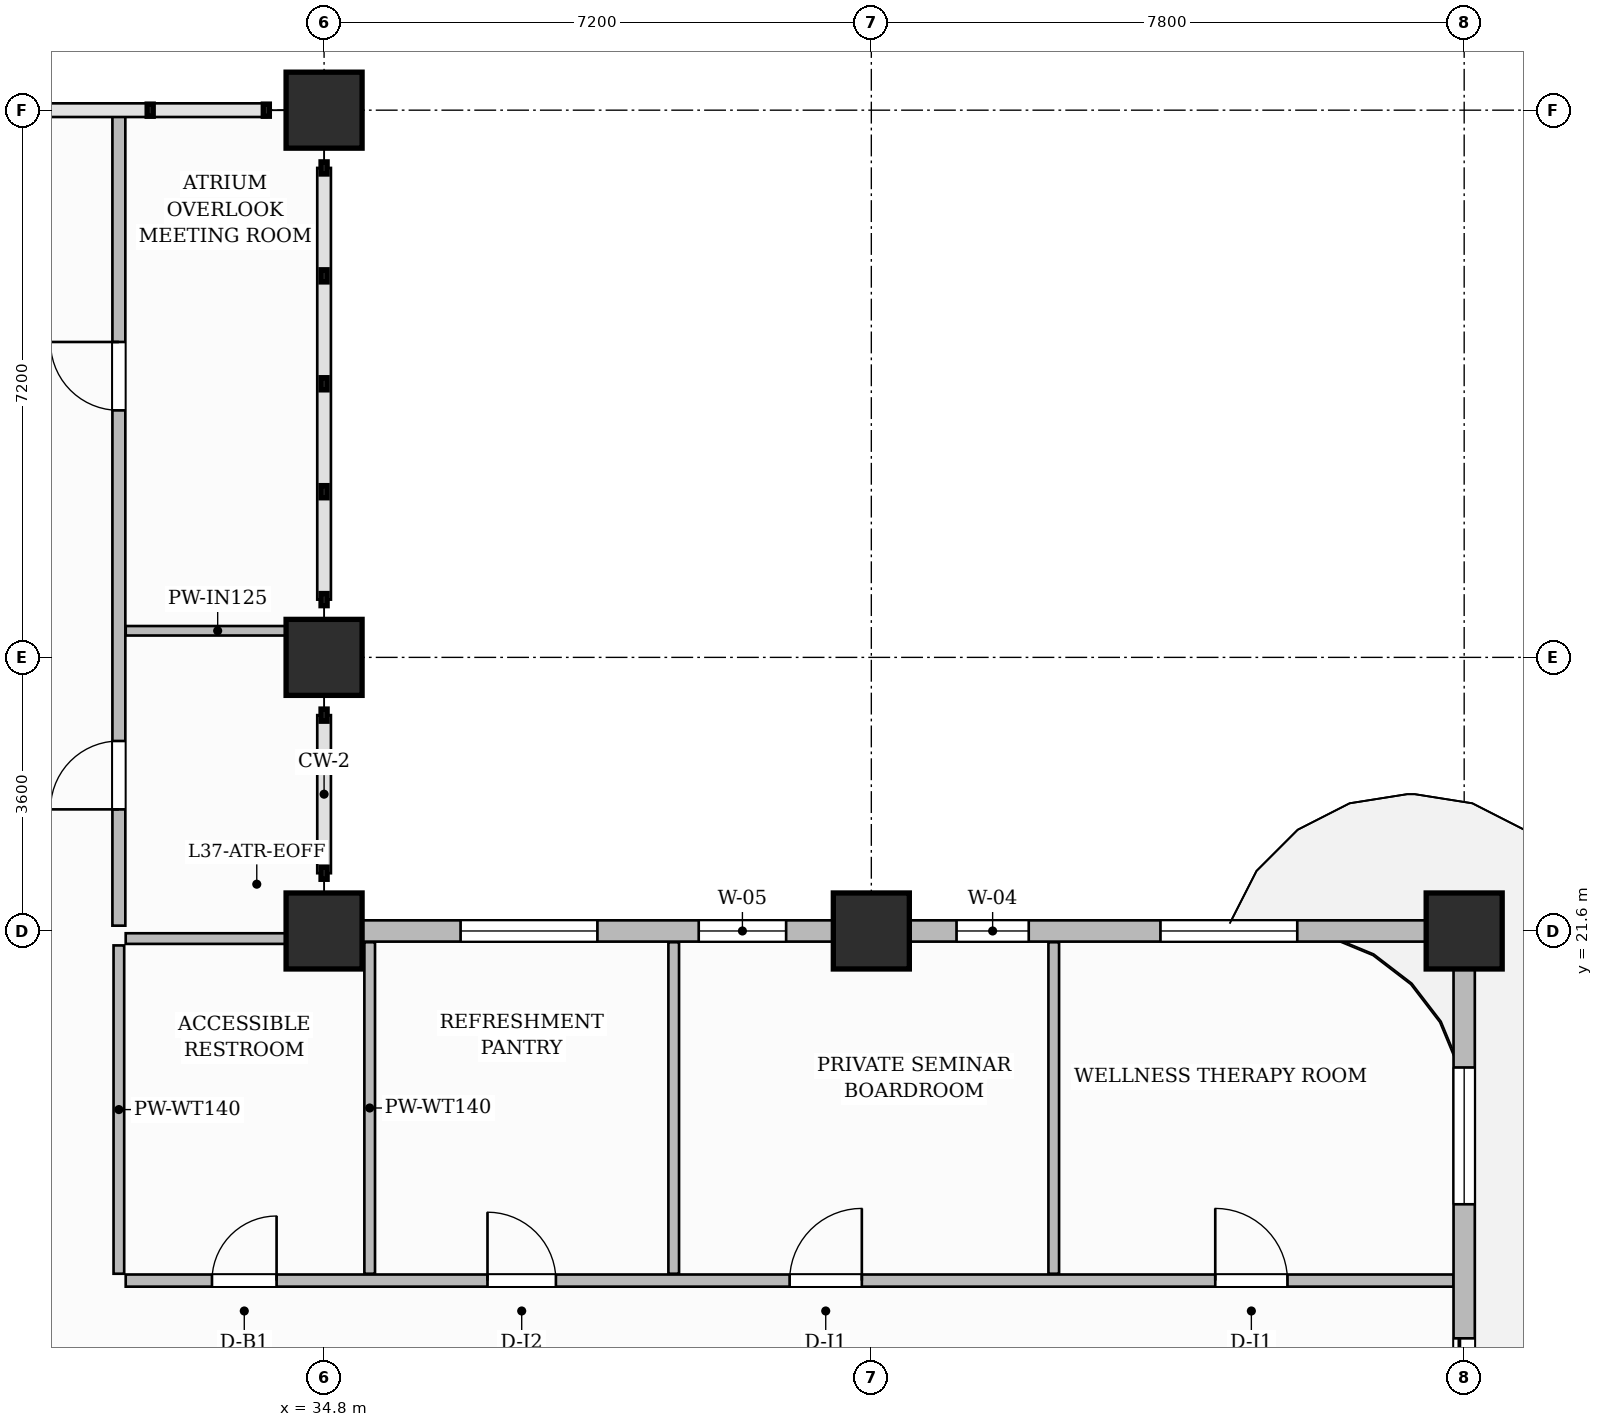
"""IFC4 building model, lengths in metres.
Left out: names, types, materials, properties, quantities, classifications, styles, units other than length and angle.
Written with IfcOpenShell. Run it as: python <this file> out.ifc"""

import sys

from ifc_helpers import new_model, si_unit, direction, frame, frame_2d, origin, origin_2d, place, context, subcontext, project, spatial, rectangle, extrude, source, transform, mapped, element, fill, save


model = new_model("IFC4")
c1 = context("Model", 3, precision=1e-05, world=origin(), true_north=direction((0.0, 1.0)))
c2 = subcontext(c1, "Body", "Model", "MODEL_VIEW")
j1 = project(units=[si_unit("LENGTHUNIT", "METRE"), si_unit("PLANEANGLEUNIT", "RADIAN")], contexts=[c1])
p1 = place(None, origin())
s1 = spatial("IfcSite", under=j1, at=p1, CompositionType="ELEMENT")
p2 = place(p1, origin())
s2 = spatial("IfcBuilding", under=s1, at=p2, CompositionType="ELEMENT")
p3 = place(p2, frame((0.0, 0.0, 150.3)))
s3 = spatial("IfcBuildingStorey", under=s2, at=p3, CompositionType="ELEMENT", Elevation=150.3)
m1 = source(origin(), c2, "Body", "SweptSolid", [
    extrude(rectangle(XDim=1.0, YDim=1.0, at=origin_2d()), origin(), (0.0, 0.0, 1.0), 3.85),
])
for number, where, z_axis, x_axis in (
    (1, (34.8, 21.6, 0.0), (0.0, 0.0, 1.0), (1.0, 0.0, 0.0)),
    (2, (34.8, 25.2, 0.0), (0.0, 0.0, 1.0), (1.0, 0.0, 0.0)),
    (3, (34.8, 32.4, 0.0), (0.0, 0.0, 1.0), (1.0, 0.0, 0.0)),
    (4, (42.0, 21.6, 0.0), (0.0, 0.0, 1.0), (1.0, 0.0, 0.0)),
    (5, (49.8, 21.6, 0.0), (0.0, 0.0, 1.0), (1.0, 0.0, 0.0)),
):
    element("IfcColumn", number, at=place(p3, frame(where, z_axis=z_axis, x_axis=x_axis)), inside=s3, PredefinedType="COLUMN", context=c2, shape_type="MappedRepresentation", body=[
        mapped(m1, transform((0.0, 0.0, 0.0), scale=1.0)),
    ])
p4 = place(p3, frame((32.19, 17.0, 0.0), z_axis=(0.0, 0.0, 1.0), x_axis=(1.0, 0.0, 0.0)))
e6 = element("IfcWall", 6, at=p4, inside=s3, PredefinedType="PARTITIONING", context=c2, shape_type="SweptSolid", body=[
    extrude(rectangle(XDim=17.47, YDim=0.16, at=frame_2d((8.735, 0.0))), origin(), (0.0, 0.0, 1.0), 3.6),
])
p5 = place(p4, frame((1.135, 0.0, 0.0)))
e7 = element("IfcOpeningElement", 7, at=p5, cuts=e6, PredefinedType="OPENING", context=c2, shape_type="SweptSolid", body=[
    extrude(rectangle(XDim=0.85, YDim=2.1, at=frame_2d((0.425, 1.05))), frame((0.0, 0.09, 0.0), z_axis=(0.0, -1.0, 0.0), x_axis=(1.0, 0.0, 0.0)), (0.0, 0.0, 1.0), 0.18),
])
p6 = place(p4, frame((4.76, 0.0, 0.0)))
e8 = element("IfcOpeningElement", 8, at=p6, cuts=e6, PredefinedType="OPENING", context=c2, shape_type="SweptSolid", body=[
    extrude(rectangle(XDim=0.9, YDim=2.15, at=frame_2d((0.45, 1.075))), frame((0.0, 0.09, 0.0), z_axis=(0.0, -1.0, 0.0), x_axis=(1.0, 0.0, 0.0)), (0.0, 0.0, 1.0), 0.18),
])
p7 = place(p4, frame((8.735, 0.0, 0.0)))
e9 = element("IfcOpeningElement", 9, at=p7, cuts=e6, PredefinedType="OPENING", context=c2, shape_type="SweptSolid", body=[
    extrude(rectangle(XDim=0.95, YDim=2.15, at=frame_2d((0.475, 1.075))), frame((0.0, 0.09, 0.0), z_axis=(0.0, -1.0, 0.0), x_axis=(1.0, 0.0, 0.0)), (0.0, 0.0, 1.0), 0.18),
])
p8 = place(p4, frame((14.335, 0.0, 0.0)))
e10 = element("IfcOpeningElement", 10, at=p8, cuts=e6, PredefinedType="OPENING", context=c2, shape_type="SweptSolid", body=[
    extrude(rectangle(XDim=0.95, YDim=2.15, at=frame_2d((0.475, 1.075))), frame((0.0, 0.09, 0.0), z_axis=(0.0, -1.0, 0.0), x_axis=(1.0, 0.0, 0.0)), (0.0, 0.0, 1.0), 0.18),
])
p9 = place(p3, frame((32.1, 17.09, 0.0), z_axis=(0.0, 0.0, 1.0), x_axis=(0.0, 1.0, 0.0)))
e11 = element("IfcWall", 11, at=p9, inside=s3, PredefinedType="PARTITIONING", context=c2, shape_type="SweptSolid", body=[
    extrude(rectangle(XDim=4.32, YDim=0.14, at=frame_2d((2.16, 0.0))), origin(), (0.0, 0.0, 1.0), 3.6),
])
for number, where, z_axis, x_axis in (
    (12, (35.4, 17.09, 0.0), (0.0, 0.0, 1.0), (0.0, 1.0, 0.0)),
    (13, (39.4, 17.09, 0.0), (0.0, 0.0, 1.0), (0.0, 1.0, 0.0)),
    (14, (44.4, 17.09, 0.0), (0.0, 0.0, 1.0), (0.0, 1.0, 0.0)),
):
    element("IfcWall", number, at=place(p3, frame(where, z_axis=z_axis, x_axis=x_axis)), inside=s3, PredefinedType="PARTITIONING", context=c2, shape_type="SweptSolid", body=[
        extrude(rectangle(XDim=4.362, YDim=0.14, at=frame_2d((2.181, 0.0))), origin(), (0.0, 0.0, 1.0), 3.6),
    ])
p10 = place(p3, frame((32.19, 21.5, 0.0), z_axis=(0.0, 0.0, 1.0), x_axis=(1.0, 0.0, 0.0)))
e15 = element("IfcWall", 15, at=p10, inside=s3, PredefinedType="PARTITIONING", context=c2, shape_type="SweptSolid", body=[
    extrude(rectangle(XDim=2.42, YDim=0.14, at=frame_2d((1.21, 0.0))), origin(), (0.0, 0.0, 1.0), 3.085),
])
p11 = place(p3, frame((32.1, 21.67, 0.0), z_axis=(0.0, 0.0, 1.0), x_axis=(0.0, 1.0, 0.0)))
e16 = element("IfcWall", 16, at=p11, inside=s3, PredefinedType="PARTITIONING", context=c2, shape_type="SweptSolid", body=[
    extrude(rectangle(XDim=10.702, YDim=0.17, at=frame_2d((5.351, 0.0))), origin(), (0.0, 0.0, 1.0), 3.6),
])
p12 = place(p11, frame((1.53, 0.0, 0.0)))
e17 = element("IfcOpeningElement", 17, at=p12, cuts=e16, PredefinedType="OPENING", context=c2, shape_type="SweptSolid", body=[
    extrude(rectangle(XDim=0.9, YDim=2.15, at=frame_2d((0.45, 1.075))), frame((0.0, 0.095, 0.0), z_axis=(0.0, -1.0, 0.0), x_axis=(1.0, 0.0, 0.0)), (0.0, 0.0, 1.0), 0.19),
])
p13 = place(p11, frame((6.78, 0.0, 0.0)))
e18 = element("IfcOpeningElement", 18, at=p13, cuts=e16, PredefinedType="OPENING", context=c2, shape_type="SweptSolid", body=[
    extrude(rectangle(XDim=0.9, YDim=2.15, at=frame_2d((0.45, 1.075))), frame((0.0, 0.095, 0.0), z_axis=(0.0, -1.0, 0.0), x_axis=(1.0, 0.0, 0.0)), (0.0, 0.0, 1.0), 0.19),
])
p14 = place(p3, frame((32.19, 25.55, 0.0), z_axis=(0.0, 0.0, 1.0), x_axis=(1.0, 0.0, 0.0)))
e19 = element("IfcWall", 19, at=p14, inside=s3, PredefinedType="PARTITIONING", context=c2, shape_type="SweptSolid", body=[
    extrude(rectangle(XDim=2.42, YDim=0.125, at=frame_2d((1.21, 0.0))), origin(), (0.0, 0.0, 1.0), 3.6),
])
p15 = place(p3, frame((49.8, 14.62, 0.0), z_axis=(0.0, 0.0, 1.0), x_axis=(0.0, 1.0, 0.0)))
e20 = element("IfcWall", 20, at=p15, inside=s3, PredefinedType="SOLIDWALL", context=c2, shape_type="SweptSolid", body=[
    extrude(rectangle(XDim=6.93, YDim=0.28, at=frame_2d((3.465, 0.0))), origin(), (0.0, 0.0, 1.0), 3.085),
])
p16 = place(p15, frame((0.42, 0.0, 0.0)))
e21 = element("IfcOpeningElement", 21, at=p16, cuts=e20, PredefinedType="OPENING", context=c2, shape_type="SweptSolid", body=[
    extrude(rectangle(XDim=1.2, YDim=2.2, at=frame_2d((0.6, 1.1))), frame((0.0, 0.15, 0.0), z_axis=(0.0, -1.0, 0.0), x_axis=(1.0, 0.0, 0.0)), (0.0, 0.0, 1.0), 0.3),
])
p17 = place(p15, frame((3.384, 0.0, 0.8)))
e22 = element("IfcOpeningElement", 22, at=p17, cuts=e20, PredefinedType="OPENING", context=c2, shape_type="SweptSolid", body=[
    extrude(rectangle(XDim=1.8, YDim=1.85, at=frame_2d((0.9, 0.925))), frame((0.0, 0.15, 0.0), z_axis=(0.0, -1.0, 0.0), x_axis=(1.0, 0.0, 0.0)), (0.0, 0.0, 1.0), 0.3),
])
p18 = place(p3, frame((34.8, 21.6, 0.0), z_axis=(0.0, 0.0, 1.0), x_axis=(1.0, 0.0, 0.0)))
e23 = element("IfcWall", 23, at=p18, inside=s3, PredefinedType="SOLIDWALL", context=c2, shape_type="SweptSolid", body=[
    extrude(rectangle(XDim=15.0, YDim=0.28, at=frame_2d((7.5, 0.0))), origin(), (0.0, 0.0, 1.0), 3.085),
])
p19 = place(p18, frame((1.796, 0.0, 0.8)))
e24 = element("IfcOpeningElement", 24, at=p19, cuts=e23, PredefinedType="OPENING", context=c2, shape_type="SweptSolid", body=[
    extrude(rectangle(XDim=1.8, YDim=1.85, at=frame_2d((0.9, 0.925))), frame((0.0, 0.15, 0.0), z_axis=(0.0, -1.0, 0.0), x_axis=(1.0, 0.0, 0.0)), (0.0, 0.0, 1.0), 0.3),
])
p20 = place(p18, frame((4.929, 0.0, 0.8)))
e25 = element("IfcOpeningElement", 25, at=p20, cuts=e23, PredefinedType="OPENING", context=c2, shape_type="SweptSolid", body=[
    extrude(rectangle(XDim=1.15, YDim=1.8, at=frame_2d((0.575, 0.9))), frame((0.0, 0.15, 0.0), z_axis=(0.0, -1.0, 0.0), x_axis=(1.0, 0.0, 0.0)), (0.0, 0.0, 1.0), 0.3),
])
p21 = place(p18, frame((8.321, 0.0, 0.8)))
e26 = element("IfcOpeningElement", 26, at=p21, cuts=e23, PredefinedType="OPENING", context=c2, shape_type="SweptSolid", body=[
    extrude(rectangle(XDim=0.95, YDim=1.75, at=frame_2d((0.475, 0.875))), frame((0.0, 0.15, 0.0), z_axis=(0.0, -1.0, 0.0), x_axis=(1.0, 0.0, 0.0)), (0.0, 0.0, 1.0), 0.3),
])
p22 = place(p18, frame((11.004, 0.0, 0.8)))
e27 = element("IfcOpeningElement", 27, at=p22, cuts=e23, PredefinedType="OPENING", context=c2, shape_type="SweptSolid", body=[
    extrude(rectangle(XDim=1.8, YDim=1.85, at=frame_2d((0.9, 0.925))), frame((0.0, 0.15, 0.0), z_axis=(0.0, -1.0, 0.0), x_axis=(1.0, 0.0, 0.0)), (0.0, 0.0, 1.0), 0.3),
])
m2 = source(origin(), c2, "Body", "SweptSolid", [
    extrude(rectangle(XDim=0.85, YDim=2.1, at=frame_2d((0.425, 1.05))), frame((0.0, 0.025, 0.0), z_axis=(0.0, -1.0, 0.0), x_axis=(1.0, 0.0, 0.0)), (0.0, 0.0, 1.0), 0.05),
])
p23 = place(p5, origin())
e28 = element("IfcDoor", 28, at=p23, inside=s3, OperationType="SINGLE_SWING_RIGHT", PredefinedType="DOOR", context=c2, shape_type="MappedRepresentation", body=[
    mapped(m2, transform((0.0, 0.0, 0.0), scale=1.0)),
])
fill(e7, e28)
m3 = source(origin(), c2, "Body", "SweptSolid", [
    extrude(rectangle(XDim=0.9, YDim=2.15, at=frame_2d((0.45, 1.075))), frame((0.0, 0.025, 0.0), z_axis=(0.0, -1.0, 0.0), x_axis=(1.0, 0.0, 0.0)), (0.0, 0.0, 1.0), 0.05),
])
p24 = place(p6, origin())
e29 = element("IfcDoor", 29, at=p24, inside=s3, OperationType="SINGLE_SWING_LEFT", PredefinedType="DOOR", context=c2, shape_type="MappedRepresentation", body=[
    mapped(m3, transform((0.0, 0.0, 0.0), scale=1.0)),
])
fill(e8, e29)
m4 = source(origin(), c2, "Body", "SweptSolid", [
    extrude(rectangle(XDim=0.95, YDim=2.15, at=frame_2d((0.475, 1.075))), frame((0.0, 0.025, 0.0), z_axis=(0.0, -1.0, 0.0), x_axis=(1.0, 0.0, 0.0)), (0.0, 0.0, 1.0), 0.05),
])
p25 = place(p7, origin())
e30 = element("IfcDoor", 30, at=p25, inside=s3, OperationType="SINGLE_SWING_RIGHT", PredefinedType="DOOR", context=c2, shape_type="MappedRepresentation", body=[
    mapped(m4, transform((0.0, 0.0, 0.0), scale=1.0)),
])
fill(e9, e30)
p26 = place(p8, origin())
e31 = element("IfcDoor", 31, at=p26, inside=s3, OperationType="SINGLE_SWING_LEFT", PredefinedType="DOOR", context=c2, shape_type="MappedRepresentation", body=[
    mapped(m4, transform((0.0, 0.0, 0.0), scale=1.0)),
])
fill(e10, e31)
p27 = place(p12, origin())
e32 = element("IfcDoor", 32, at=p27, inside=s3, OperationType="SINGLE_SWING_LEFT", PredefinedType="DOOR", context=c2, shape_type="MappedRepresentation", body=[
    mapped(m3, transform((0.0, 0.0, 0.0), scale=1.0)),
])
fill(e17, e32)
p28 = place(p13, origin())
e33 = element("IfcDoor", 33, at=p28, inside=s3, OperationType="SINGLE_SWING_RIGHT", PredefinedType="DOOR", context=c2, shape_type="MappedRepresentation", body=[
    mapped(m3, transform((0.0, 0.0, 0.0), scale=1.0)),
])
fill(e18, e33)
m5 = source(origin(), c2, "Body", "SweptSolid", [
    extrude(rectangle(XDim=1.2, YDim=2.2, at=frame_2d((0.6, 1.1))), frame((0.0, 0.025, 0.0), z_axis=(0.0, -1.0, 0.0), x_axis=(1.0, 0.0, 0.0)), (0.0, 0.0, 1.0), 0.05),
])
p29 = place(p16, origin())
e34 = element("IfcDoor", 34, at=p29, inside=s3, OperationType="SLIDING_TO_LEFT", PredefinedType="DOOR", context=c2, shape_type="MappedRepresentation", body=[
    mapped(m5, transform((0.0, 0.0, 0.0), scale=1.0)),
])
fill(e21, e34)
m6 = source(origin(), c2, "Body", "SweptSolid", [
    extrude(rectangle(XDim=1.8, YDim=1.85, at=frame_2d((0.9, 0.925))), frame((0.0, 0.03, 0.0), z_axis=(0.0, -1.0, 0.0), x_axis=(1.0, 0.0, 0.0)), (0.0, 0.0, 1.0), 0.06),
])
p30 = place(p17, origin())
e35 = element("IfcWindow", 35, at=p30, inside=s3, PartitioningType="DOUBLE_PANEL_VERTICAL", PredefinedType="WINDOW", context=c2, shape_type="MappedRepresentation", body=[
    mapped(m6, transform((0.0, 0.0, 0.0), scale=1.0)),
])
fill(e22, e35)
p31 = place(p19, origin())
e36 = element("IfcWindow", 36, at=p31, inside=s3, PartitioningType="DOUBLE_PANEL_VERTICAL", PredefinedType="WINDOW", context=c2, shape_type="MappedRepresentation", body=[
    mapped(m6, transform((0.0, 0.0, 0.0), scale=1.0)),
])
fill(e24, e36)
m7 = source(origin(), c2, "Body", "SweptSolid", [
    extrude(rectangle(XDim=1.15, YDim=1.8, at=frame_2d((0.575, 0.9))), frame((0.0, 0.03, 0.0), z_axis=(0.0, -1.0, 0.0), x_axis=(1.0, 0.0, 0.0)), (0.0, 0.0, 1.0), 0.06),
])
p32 = place(p20, origin())
e37 = element("IfcWindow", 37, at=p32, inside=s3, PartitioningType="SINGLE_PANEL", PredefinedType="WINDOW", context=c2, shape_type="MappedRepresentation", body=[
    mapped(m7, transform((0.0, 0.0, 0.0), scale=1.0)),
])
fill(e25, e37)
m8 = source(origin(), c2, "Body", "SweptSolid", [
    extrude(rectangle(XDim=0.95, YDim=1.75, at=frame_2d((0.475, 0.875))), frame((0.0, 0.03, 0.0), z_axis=(0.0, -1.0, 0.0), x_axis=(1.0, 0.0, 0.0)), (0.0, 0.0, 1.0), 0.06),
])
p33 = place(p21, origin())
e38 = element("IfcWindow", 38, at=p33, inside=s3, PartitioningType="SINGLE_PANEL", PredefinedType="WINDOW", context=c2, shape_type="MappedRepresentation", body=[
    mapped(m8, transform((0.0, 0.0, 0.0), scale=1.0)),
])
fill(e26, e38)
p34 = place(p22, origin())
e39 = element("IfcWindow", 39, at=p34, inside=s3, PartitioningType="DOUBLE_PANEL_VERTICAL", PredefinedType="WINDOW", context=c2, shape_type="MappedRepresentation", body=[
    mapped(m6, transform((0.0, 0.0, 0.0), scale=1.0)),
])
fill(e27, e39)
save(model, sys.argv[1])
